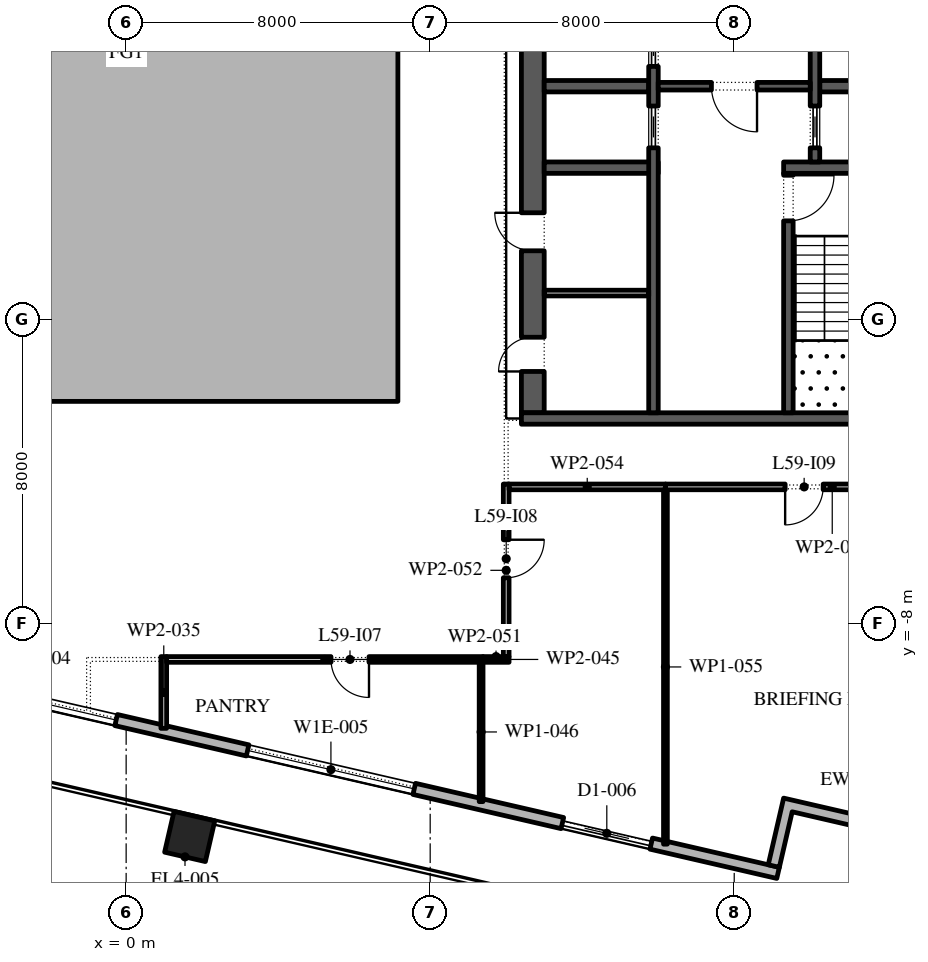
"""IFC4 building model, lengths in metres.
Left out: names, types, materials, properties, quantities, classifications, styles, units other than length and angle.
Written with IfcOpenShell. Run it as: python <this file> out.ifc"""

import sys

from ifc_helpers import new_model, si_unit, direction, frame, frame_2d, origin, origin_2d, place, context, subcontext, project, spatial, polyline, rectangle, outline, extrude, element, fill, save


model = new_model("IFC4")
c1 = context("Model", 3, precision=1e-05, world=origin(), true_north=direction((0.0, 1.0)))
c2 = subcontext(c1, "Body", "Model", "MODEL_VIEW")
j1 = project(units=[si_unit("LENGTHUNIT", "METRE"), si_unit("PLANEANGLEUNIT", "RADIAN")], contexts=[c1])
p1 = place(None, origin())
s1 = spatial("IfcSite", under=j1, at=p1, CompositionType="ELEMENT")
p2 = place(p1, origin())
s2 = spatial("IfcBuilding", under=s1, at=p2, CompositionType="ELEMENT")
p3 = place(p2, frame((0.0, 0.0, 272.4)))
s3 = spatial("IfcBuildingStorey", under=s2, at=p3, CompositionType="ELEMENT", Elevation=272.4)
p4 = place(p3, frame((1.672, -13.599, 0.0), z_axis=(0.0, 0.0, 1.0), x_axis=(0.974370064785, -0.224951054344, 0.0)))
e1 = element("IfcColumn", 1, at=p4, inside=s3, PredefinedType="COLUMN", context=c2, shape_type="SweptSolid", body=[
    extrude(rectangle(XDim=1.1, YDim=1.1, at=origin_2d()), origin(), (0.0, 0.0, 1.0), 4.2),
])
p5 = place(p3, origin())
e2 = element("IfcWall", 2, at=p5, inside=s3, PredefinedType="STANDARD", context=c2, shape_type="SweptSolid", body=[
    extrude(outline(polyline([(-7.15, -2.15), (7.15, -2.15), (7.15, 16.15), (-7.15, 16.15), (-7.15, -2.15)]), holes=[polyline([(-7.0, -2.0), (-7.0, 16.0), (7.0, 16.0), (7.0, -2.0), (-7.0, -2.0)])]), origin(), (0.0, 0.0, 1.0), 4.0),
])
p6 = place(p3, frame((-29.616, -3.758, 0.0), z_axis=(0.0, 0.0, 1.0), x_axis=(0.974370532314, -0.224949029246, 0.0)))
e3 = element("IfcWall", 3, at=p6, inside=s3, PredefinedType="STANDARD", context=c2, shape_type="SweptSolid", body=[
    extrude(rectangle(XDim=48.0, YDim=0.3, at=frame_2d((24.0, 0.0))), origin(), (0.0, 0.0, 1.0), 4.0),
])
p7 = place(p6, frame((1.625, 0.0, 0.45)))
e4 = element("IfcOpeningElement", 4, at=p7, cuts=e3, PredefinedType="OPENING", context=c2, shape_type="SweptSolid", body=[
    extrude(rectangle(XDim=4.5, YDim=3.05, at=frame_2d((2.25, 1.525))), frame((0.0, 0.16, 0.0), z_axis=(0.0, -1.0, 0.0), x_axis=(1.0, 0.0, 0.0)), (0.0, 0.0, 1.0), 0.32),
])
p8 = place(p6, frame((10.575, 0.0, 0.0)))
e5 = element("IfcOpeningElement", 5, at=p8, cuts=e3, PredefinedType="OPENING", context=c2, shape_type="SweptSolid", body=[
    extrude(rectangle(XDim=2.4, YDim=3.5, at=frame_2d((1.2, 1.75))), frame((0.0, 0.16, 0.0), z_axis=(0.0, -1.0, 0.0), x_axis=(1.0, 0.0, 0.0)), (0.0, 0.0, 1.0), 0.32),
])
p9 = place(p6, frame((17.575, 0.0, 0.45)))
e6 = element("IfcOpeningElement", 6, at=p9, cuts=e3, PredefinedType="OPENING", context=c2, shape_type="SweptSolid", body=[
    extrude(rectangle(XDim=4.5, YDim=3.0, at=frame_2d((2.25, 1.5))), frame((0.0, 0.16, 0.0), z_axis=(0.0, -1.0, 0.0), x_axis=(1.0, 0.0, 0.0)), (0.0, 0.0, 1.0), 0.32),
])
p10 = place(p6, frame((25.625, 0.0, 0.45)))
e7 = element("IfcOpeningElement", 7, at=p10, cuts=e3, PredefinedType="OPENING", context=c2, shape_type="SweptSolid", body=[
    extrude(rectangle(XDim=4.5, YDim=2.95, at=frame_2d((2.25, 1.475))), frame((0.0, 0.16, 0.0), z_axis=(0.0, -1.0, 0.0), x_axis=(1.0, 0.0, 0.0)), (0.0, 0.0, 1.0), 0.32),
])
p11 = place(p6, frame((33.675, 0.0, 0.45)))
e8 = element("IfcOpeningElement", 8, at=p11, cuts=e3, PredefinedType="OPENING", context=c2, shape_type="SweptSolid", body=[
    extrude(rectangle(XDim=4.5, YDim=2.825, at=frame_2d((2.25, 1.413))), frame((0.0, 0.16, 0.0), z_axis=(0.0, -1.0, 0.0), x_axis=(1.0, 0.0, 0.0)), (0.0, 0.0, 1.0), 0.32),
])
p12 = place(p6, frame((42.175, 0.0, 0.0)))
e9 = element("IfcOpeningElement", 9, at=p12, cuts=e3, PredefinedType="OPENING", context=c2, shape_type="SweptSolid", body=[
    extrude(rectangle(XDim=2.4, YDim=3.5, at=frame_2d((1.2, 1.75))), frame((0.0, 0.16, 0.0), z_axis=(0.0, -1.0, 0.0), x_axis=(1.0, 0.0, 0.0)), (0.0, 0.0, 1.0), 0.32),
])
p13 = place(p3, origin())
e10 = element("IfcWall", 10, at=p13, inside=s3, PredefinedType="STANDARD", context=c2, shape_type="SweptSolid", body=[
    extrude(outline(polyline([(19.054, -12.993), (19.459, -11.24), (21.505, -11.712), (21.438, -12.004), (19.684, -11.599), (19.279, -13.353), (17.525, -12.948), (17.188, -14.41), (16.895, -14.342), (17.3, -12.588), (19.054, -12.993)])), origin(), (0.0, 0.0, 1.0), 4.0),
])
p14 = place(p3, frame((10.7, -2.45, 0.0), z_axis=(0.0, 0.0, 1.0), x_axis=(0.0, 1.0, 0.0)))
e11 = element("IfcWall", 11, at=p14, inside=s3, PredefinedType="SHEAR", context=c2, shape_type="SweptSolid", body=[
    extrude(rectangle(XDim=27.9, YDim=0.6, at=frame_2d((13.95, 0.0))), origin(), (0.0, 0.0, 1.0), 4.0),
])
p15 = place(p14, frame((23.65, 0.0, 0.0)))
e12 = element("IfcOpeningElement", 12, at=p15, cuts=e11, PredefinedType="OPENING", context=c2, shape_type="SweptSolid", body=[
    extrude(rectangle(XDim=2.4, YDim=2.1, at=frame_2d((1.2, 1.05))), frame((0.0, 0.31, 0.0), z_axis=(0.0, -1.0, 0.0), x_axis=(1.0, 0.0, 0.0)), (0.0, 0.0, 1.0), 0.62),
])
p16 = place(p14, frame((1.087, 0.0, 0.0)))
e13 = element("IfcOpeningElement", 13, at=p16, cuts=e11, PredefinedType="OPENING", context=c2, shape_type="SweptSolid", body=[
    extrude(rectangle(XDim=0.9, YDim=2.1, at=frame_2d((0.45, 1.05))), frame((0.0, 0.31, 0.0), z_axis=(0.0, -1.0, 0.0), x_axis=(1.0, 0.0, 0.0)), (0.0, 0.0, 1.0), 0.62),
])
p17 = place(p14, frame((4.262, 0.0, 0.0)))
e14 = element("IfcOpeningElement", 14, at=p17, cuts=e11, PredefinedType="OPENING", context=c2, shape_type="SweptSolid", body=[
    extrude(rectangle(XDim=1.0, YDim=2.1, at=frame_2d((0.5, 1.05))), frame((0.0, 0.31, 0.0), z_axis=(0.0, -1.0, 0.0), x_axis=(1.0, 0.0, 0.0)), (0.0, 0.0, 1.0), 0.62),
])
p18 = place(p3, frame((10.4, -2.6, 0.0), z_axis=(0.0, 0.0, 1.0), x_axis=(1.0, 0.0, 0.0)))
e15 = element("IfcWall", 15, at=p18, inside=s3, PredefinedType="SHEAR", context=c2, shape_type="SweptSolid", body=[
    extrude(rectangle(XDim=11.2, YDim=0.3, at=frame_2d((5.6, 0.0))), origin(), (0.0, 0.0, 1.0), 4.0),
])
p19 = place(p3, frame((17.3, 4.0, 0.0), z_axis=(0.0, 0.0, 1.0), x_axis=(1.0, 0.0, 0.0)))
e16 = element("IfcWall", 16, at=p19, inside=s3, PredefinedType="SHEAR", context=c2, shape_type="SweptSolid", body=[
    extrude(rectangle(XDim=3.7, YDim=0.3, at=frame_2d((1.85, 0.0))), origin(), (0.0, 0.0, 1.0), 4.0),
])
p20 = place(p3, frame((17.425, -2.45, 0.0), z_axis=(0.0, 0.0, 1.0), x_axis=(0.0, 1.0, 0.0)))
e17 = element("IfcWall", 17, at=p20, inside=s3, PredefinedType="SHEAR", context=c2, shape_type="SweptSolid", body=[
    extrude(rectangle(XDim=6.3, YDim=0.25, at=frame_2d((3.15, 0.0))), origin(), (0.0, 0.0, 1.0), 4.0),
])
p21 = place(p20, frame((5.05, 0.0, 0.0)))
e18 = element("IfcOpeningElement", 18, at=p21, cuts=e17, PredefinedType="OPENING", context=c2, shape_type="SweptSolid", body=[
    extrude(rectangle(XDim=1.2, YDim=2.1, at=frame_2d((0.6, 1.05))), frame((0.0, 0.135, 0.0), z_axis=(0.0, -1.0, 0.0), x_axis=(1.0, 0.0, 0.0)), (0.0, 0.0, 1.0), 0.27),
])
p22 = place(p3, frame((18.25, 6.143, 0.0), z_axis=(0.0, 0.0, 1.0), x_axis=(1.0, 0.0, 0.0)))
e19 = element("IfcWall", 19, at=p22, inside=s3, PredefinedType="SHEAR", context=c2, shape_type="SweptSolid", body=[
    extrude(rectangle(XDim=2.75, YDim=0.3, at=frame_2d((1.375, 0.0))), origin(), (0.0, 0.0, 1.0), 4.0),
])
p23 = place(p3, frame((18.125, 4.15, 0.0), z_axis=(0.0, 0.0, 1.0), x_axis=(0.0, 1.0, 0.0)))
e20 = element("IfcWall", 20, at=p23, inside=s3, PredefinedType="SHEAR", context=c2, shape_type="SweptSolid", body=[
    extrude(rectangle(XDim=14.7, YDim=0.25, at=frame_2d((7.35, 0.0))), origin(), (0.0, 0.0, 1.0), 4.0),
])
p24 = place(p23, frame((6.9, 0.0, 0.0)))
e21 = element("IfcOpeningElement", 21, at=p24, cuts=e20, PredefinedType="OPENING", context=c2, shape_type="SweptSolid", body=[
    extrude(rectangle(XDim=0.9, YDim=2.1, at=frame_2d((0.45, 1.05))), frame((0.0, 0.135, 0.0), z_axis=(0.0, -1.0, 0.0), x_axis=(1.0, 0.0, 0.0)), (0.0, 0.0, 1.0), 0.27),
])
p25 = place(p23, frame((0.371, 0.0, 0.0)))
e22 = element("IfcOpeningElement", 22, at=p25, cuts=e20, PredefinedType="OPENING", context=c2, shape_type="SweptSolid", body=[
    extrude(rectangle(XDim=1.1, YDim=2.1, at=frame_2d((0.55, 1.05))), frame((0.0, 0.135, 0.0), z_axis=(0.0, -1.0, 0.0), x_axis=(1.0, 0.0, 0.0)), (0.0, 0.0, 1.0), 0.27),
])
p26 = place(p23, frame((13.229, 0.0, 0.0)))
e23 = element("IfcOpeningElement", 23, at=p26, cuts=e20, PredefinedType="OPENING", context=c2, shape_type="SweptSolid", body=[
    extrude(rectangle(XDim=1.1, YDim=2.1, at=frame_2d((0.55, 1.05))), frame((0.0, 0.135, 0.0), z_axis=(0.0, -1.0, 0.0), x_axis=(1.0, 0.0, 0.0)), (0.0, 0.0, 1.0), 0.27),
])
p27 = place(p3, frame((11.0, 4.0, 0.0), z_axis=(0.0, 0.0, 1.0), x_axis=(1.0, 0.0, 0.0)))
e24 = element("IfcWall", 24, at=p27, inside=s3, PredefinedType="SHEAR", context=c2, shape_type="SweptSolid", body=[
    extrude(rectangle(XDim=3.0, YDim=0.3, at=frame_2d((1.5, 0.0))), origin(), (0.0, 0.0, 1.0), 4.0),
])
p28 = place(p3, frame((11.0, 6.143, 0.0), z_axis=(0.0, 0.0, 1.0), x_axis=(1.0, 0.0, 0.0)))
e25 = element("IfcWall", 25, at=p28, inside=s3, PredefinedType="SHEAR", context=c2, shape_type="SweptSolid", body=[
    extrude(rectangle(XDim=2.75, YDim=0.3, at=frame_2d((1.375, 0.0))), origin(), (0.0, 0.0, 1.0), 4.0),
])
p29 = place(p3, frame((13.875, -2.45, 0.0), z_axis=(0.0, 0.0, 1.0), x_axis=(0.0, 1.0, 0.0)))
e26 = element("IfcWall", 26, at=p29, inside=s3, PredefinedType="SHEAR", context=c2, shape_type="SweptSolid", body=[
    extrude(rectangle(XDim=21.3, YDim=0.25, at=frame_2d((10.65, 0.0))), origin(), (0.0, 0.0, 1.0), 4.0),
])
p30 = place(p29, frame((17.786, 0.0, 0.0)))
e27 = element("IfcOpeningElement", 27, at=p30, cuts=e26, PredefinedType="OPENING", context=c2, shape_type="SweptSolid", body=[
    extrude(rectangle(XDim=0.9, YDim=2.1, at=frame_2d((0.45, 1.05))), frame((0.0, 0.135, 0.0), z_axis=(0.0, -1.0, 0.0), x_axis=(1.0, 0.0, 0.0)), (0.0, 0.0, 1.0), 0.27),
])
p31 = place(p29, frame((6.971, 0.0, 0.0)))
e28 = element("IfcOpeningElement", 28, at=p31, cuts=e26, PredefinedType="OPENING", context=c2, shape_type="SweptSolid", body=[
    extrude(rectangle(XDim=1.1, YDim=2.1, at=frame_2d((0.55, 1.05))), frame((0.0, 0.135, 0.0), z_axis=(0.0, -1.0, 0.0), x_axis=(1.0, 0.0, 0.0)), (0.0, 0.0, 1.0), 0.27),
])
p32 = place(p29, frame((9.114, 0.0, 0.0)))
e29 = element("IfcOpeningElement", 29, at=p32, cuts=e26, PredefinedType="OPENING", context=c2, shape_type="SweptSolid", body=[
    extrude(rectangle(XDim=1.1, YDim=2.1, at=frame_2d((0.55, 1.05))), frame((0.0, 0.135, 0.0), z_axis=(0.0, -1.0, 0.0), x_axis=(1.0, 0.0, 0.0)), (0.0, 0.0, 1.0), 0.27),
])
p33 = place(p29, frame((11.257, 0.0, 0.0)))
e30 = element("IfcOpeningElement", 30, at=p33, cuts=e26, PredefinedType="OPENING", context=c2, shape_type="SweptSolid", body=[
    extrude(rectangle(XDim=1.1, YDim=2.1, at=frame_2d((0.55, 1.05))), frame((0.0, 0.135, 0.0), z_axis=(0.0, -1.0, 0.0), x_axis=(1.0, 0.0, 0.0)), (0.0, 0.0, 1.0), 0.27),
])
p34 = place(p29, frame((13.4, 0.0, 0.0)))
e31 = element("IfcOpeningElement", 31, at=p34, cuts=e26, PredefinedType="OPENING", context=c2, shape_type="SweptSolid", body=[
    extrude(rectangle(XDim=1.1, YDim=2.1, at=frame_2d((0.55, 1.05))), frame((0.0, 0.135, 0.0), z_axis=(0.0, -1.0, 0.0), x_axis=(1.0, 0.0, 0.0)), (0.0, 0.0, 1.0), 0.27),
])
p35 = place(p3, frame((14.0, 6.143, 0.0), z_axis=(0.0, 0.0, 1.0), x_axis=(1.0, 0.0, 0.0)))
e32 = element("IfcWall", 32, at=p35, inside=s3, PredefinedType="SHEAR", context=c2, shape_type="SweptSolid", body=[
    extrude(rectangle(XDim=4.0, YDim=0.2, at=frame_2d((2.0, 0.0))), origin(), (0.0, 0.0, 1.0), 4.0),
])
p36 = place(p35, frame((1.4, 0.0, 0.0)))
e33 = element("IfcOpeningElement", 33, at=p36, cuts=e32, PredefinedType="OPENING", context=c2, shape_type="SweptSolid", body=[
    extrude(rectangle(XDim=1.2, YDim=2.1, at=frame_2d((0.6, 1.05))), frame((0.0, 0.11, 0.0), z_axis=(0.0, -1.0, 0.0), x_axis=(1.0, 0.0, 0.0)), (0.0, 0.0, 1.0), 0.22),
])
p37 = place(p3, frame((11.0, 0.7, 0.0), z_axis=(0.0, 0.0, 1.0), x_axis=(1.0, 0.0, 0.0)))
e34 = element("IfcWall", 34, at=p37, inside=s3, PredefinedType="PARTITIONING", context=c2, shape_type="SweptSolid", body=[
    extrude(rectangle(XDim=2.75, YDim=0.15, at=frame_2d((1.375, 0.0))), origin(), (0.0, 0.0, 1.0), 4.0),
])
p38 = place(p3, frame((0.99, -8.865, 0.0), z_axis=(0.0, 0.0, 1.0), x_axis=(0.0, -1.0, 0.0)))
e35 = element("IfcWall", 35, at=p38, inside=s3, PredefinedType="PARTITIONING", context=c2, shape_type="SweptSolid", body=[
    extrude(rectangle(XDim=1.888, YDim=0.15, at=frame_2d((0.944, 0.0))), origin(), (0.0, 0.0, 1.0), 4.0),
])
p39 = place(p3, frame((9.39, -8.94, 0.0), z_axis=(0.0, 0.0, 1.0), x_axis=(-1.0, 0.0, 0.0)))
e36 = element("IfcWall", 36, at=p39, inside=s3, PredefinedType="PARTITIONING", context=c2, shape_type="SweptSolid", body=[
    extrude(rectangle(XDim=8.325, YDim=0.15, at=frame_2d((4.163, 0.0))), origin(), (0.0, 0.0, 1.0), 4.0),
])
p40 = place(p39, frame((3.0, 0.0, 0.0)))
e37 = element("IfcOpeningElement", 37, at=p40, cuts=e36, PredefinedType="OPENING", context=c2, shape_type="SweptSolid", body=[
    extrude(rectangle(XDim=1.0, YDim=2.1, at=frame_2d((0.5, 1.05))), frame((0.0, 0.085, 0.0), z_axis=(0.0, -1.0, 0.0), x_axis=(1.0, 0.0, 0.0)), (0.0, 0.0, 1.0), 0.17),
])
p41 = place(p3, frame((9.34, -9.015, 0.0), z_axis=(0.0, 0.0, 1.0), x_axis=(0.0, -1.0, 0.0)))
e38 = element("IfcWall", 38, at=p41, inside=s3, PredefinedType="PARTITIONING", context=c2, shape_type="SweptSolid", body=[
    extrude(rectangle(XDim=3.666, YDim=0.1, at=frame_2d((1.833, 0.0))), origin(), (0.0, 0.0, 1.0), 4.0),
])
p42 = place(p3, frame((10.075, -8.94, 0.0), z_axis=(0.0, 0.0, 1.0), x_axis=(-1.0, 0.0, 0.0)))
e39 = element("IfcWall", 39, at=p42, inside=s3, PredefinedType="PARTITIONING", context=c2, shape_type="SweptSolid", body=[
    extrude(rectangle(XDim=0.685, YDim=0.15, at=frame_2d((0.343, 0.0))), origin(), (0.0, 0.0, 1.0), 4.0),
])
p43 = place(p3, frame((10.0, -4.325, 0.0), z_axis=(0.0, 0.0, 1.0), x_axis=(0.0, -1.0, 0.0)))
e40 = element("IfcWall", 40, at=p43, inside=s3, PredefinedType="PARTITIONING", context=c2, shape_type="SweptSolid", body=[
    extrude(rectangle(XDim=4.54, YDim=0.15, at=frame_2d((2.27, 0.0))), origin(), (0.0, 0.0, 1.0), 4.0),
])
p44 = place(p43, frame((1.465, 0.0, 0.0)))
e41 = element("IfcOpeningElement", 41, at=p44, cuts=e40, PredefinedType="OPENING", context=c2, shape_type="SweptSolid", body=[
    extrude(rectangle(XDim=1.0, YDim=2.1, at=frame_2d((0.5, 1.05))), frame((0.0, 0.085, 0.0), z_axis=(0.0, -1.0, 0.0), x_axis=(1.0, 0.0, 0.0)), (0.0, 0.0, 1.0), 0.17),
])
p45 = place(p3, frame((14.19, -4.4, 0.0), z_axis=(0.0, 0.0, 1.0), x_axis=(-1.0, 0.0, 0.0)))
e42 = element("IfcWall", 42, at=p45, inside=s3, PredefinedType="PARTITIONING", context=c2, shape_type="SweptSolid", body=[
    extrude(rectangle(XDim=4.115, YDim=0.15, at=frame_2d((2.058, 0.0))), origin(), (0.0, 0.0, 1.0), 4.0),
])
p46 = place(p3, frame((14.19, -4.475, 0.0), z_axis=(0.0, 0.0, 1.0), x_axis=(0.0, -1.0, 0.0)))
e43 = element("IfcWall", 43, at=p46, inside=s3, PredefinedType="PARTITIONING", context=c2, shape_type="SweptSolid", body=[
    extrude(rectangle(XDim=9.325, YDim=0.1, at=frame_2d((4.663, 0.0))), origin(), (0.0, 0.0, 1.0), 4.0),
])
p47 = place(p3, frame((22.968, -4.4, 0.0), z_axis=(0.0, 0.0, 1.0), x_axis=(-1.0, 0.0, 0.0)))
e44 = element("IfcWall", 44, at=p47, inside=s3, PredefinedType="PARTITIONING", context=c2, shape_type="SweptSolid", body=[
    extrude(rectangle(XDim=8.778, YDim=0.15, at=frame_2d((4.389, 0.0))), origin(), (0.0, 0.0, 1.0), 4.0),
])
p48 = place(p47, frame((4.628, 0.0, 0.0)))
e45 = element("IfcOpeningElement", 45, at=p48, cuts=e44, PredefinedType="OPENING", context=c2, shape_type="SweptSolid", body=[
    extrude(rectangle(XDim=1.0, YDim=2.1, at=frame_2d((0.5, 1.05))), frame((0.0, 0.085, 0.0), z_axis=(0.0, -1.0, 0.0), x_axis=(1.0, 0.0, 0.0)), (0.0, 0.0, 1.0), 0.17),
])
p49 = place(p10, origin())
e46 = element("IfcWindow", 46, at=p49, inside=s3, PartitioningType="DOUBLE_PANEL_VERTICAL", PredefinedType="WINDOW", context=c2, shape_type="SweptSolid", body=[
    extrude(rectangle(XDim=4.5, YDim=2.95, at=frame_2d((2.25, 1.475))), frame((0.0, 0.03, 0.0), z_axis=(0.0, -1.0, 0.0), x_axis=(1.0, 0.0, 0.0)), (0.0, 0.0, 1.0), 0.06),
])
fill(e7, e46)
p50 = place(p11, origin())
e47 = element("IfcWindow", 47, at=p50, inside=s3, PartitioningType="DOUBLE_PANEL_VERTICAL", PredefinedType="WINDOW", context=c2, shape_type="SweptSolid", body=[
    extrude(rectangle(XDim=4.5, YDim=2.825, at=frame_2d((2.25, 1.413))), frame((0.0, 0.03, 0.0), z_axis=(0.0, -1.0, 0.0), x_axis=(1.0, 0.0, 0.0)), (0.0, 0.0, 1.0), 0.06),
])
fill(e8, e47)
p51 = place(p12, origin())
e48 = element("IfcDoor", 48, at=p51, inside=s3, OperationType="DOUBLE_DOOR_SLIDING", PredefinedType="DOOR", context=c2, shape_type="SweptSolid", body=[
    extrude(rectangle(XDim=2.4, YDim=3.5, at=frame_2d((1.2, 1.75))), frame((0.0, 0.025, 0.0), z_axis=(0.0, -1.0, 0.0), x_axis=(1.0, 0.0, 0.0)), (0.0, 0.0, 1.0), 0.05),
])
fill(e9, e48)
p52 = place(p25, origin())
e49 = element("IfcDoor", 49, at=p52, inside=s3, OperationType="SLIDING_TO_LEFT", PredefinedType="DOOR", context=c2, shape_type="SweptSolid", body=[
    extrude(rectangle(XDim=1.1, YDim=2.1, at=frame_2d((0.55, 1.05))), frame((0.0, 0.025, 0.0), z_axis=(0.0, -1.0, 0.0), x_axis=(1.0, 0.0, 0.0)), (0.0, 0.0, 1.0), 0.05),
])
fill(e22, e49)
p53 = place(p31, origin())
e50 = element("IfcDoor", 50, at=p53, inside=s3, OperationType="SLIDING_TO_LEFT", PredefinedType="DOOR", context=c2, shape_type="SweptSolid", body=[
    extrude(rectangle(XDim=1.1, YDim=2.1, at=frame_2d((0.55, 1.05))), frame((0.0, 0.025, 0.0), z_axis=(0.0, -1.0, 0.0), x_axis=(1.0, 0.0, 0.0)), (0.0, 0.0, 1.0), 0.05),
])
fill(e28, e50)
p54 = place(p32, origin())
e51 = element("IfcDoor", 51, at=p54, inside=s3, OperationType="SLIDING_TO_LEFT", PredefinedType="DOOR", context=c2, shape_type="SweptSolid", body=[
    extrude(rectangle(XDim=1.1, YDim=2.1, at=frame_2d((0.55, 1.05))), frame((0.0, 0.025, 0.0), z_axis=(0.0, -1.0, 0.0), x_axis=(1.0, 0.0, 0.0)), (0.0, 0.0, 1.0), 0.05),
])
fill(e29, e51)
p55 = place(p36, frame((1.2, 0.0, 0.0), z_axis=(0.0, 0.0, 1.0), x_axis=(-1.0, 0.0, 0.0)))
e52 = element("IfcDoor", 52, at=p55, inside=s3, OperationType="SINGLE_SWING_RIGHT", PredefinedType="DOOR", context=c2, shape_type="SweptSolid", body=[
    extrude(rectangle(XDim=1.2, YDim=2.1, at=frame_2d((0.6, 1.05))), frame((0.0, 0.025, 0.0), z_axis=(0.0, -1.0, 0.0), x_axis=(1.0, 0.0, 0.0)), (0.0, 0.0, 1.0), 0.05),
])
fill(e33, e52)
p56 = place(p21, frame((1.2, 0.0, 0.0), z_axis=(0.0, 0.0, 1.0), x_axis=(-1.0, 0.0, 0.0)))
e53 = element("IfcDoor", 53, at=p56, inside=s3, OperationType="SINGLE_SWING_RIGHT", PredefinedType="DOOR", context=c2, shape_type="SweptSolid", body=[
    extrude(rectangle(XDim=1.2, YDim=2.1, at=frame_2d((0.6, 1.05))), frame((0.0, 0.025, 0.0), z_axis=(0.0, -1.0, 0.0), x_axis=(1.0, 0.0, 0.0)), (0.0, 0.0, 1.0), 0.05),
])
fill(e18, e53)
p57 = place(p16, origin())
e54 = element("IfcDoor", 54, at=p57, inside=s3, OperationType="SINGLE_SWING_RIGHT", PredefinedType="DOOR", context=c2, shape_type="SweptSolid", body=[
    extrude(rectangle(XDim=0.9, YDim=2.1, at=frame_2d((0.45, 1.05))), frame((0.0, -0.25, 0.0), z_axis=(0.0, -1.0, 0.0), x_axis=(1.0, 0.0, 0.0)), (0.0, 0.0, 1.0), 0.05),
])
fill(e13, e54)
p58 = place(p17, origin())
e55 = element("IfcDoor", 55, at=p58, inside=s3, OperationType="SINGLE_SWING_LEFT", PredefinedType="DOOR", context=c2, shape_type="SweptSolid", body=[
    extrude(rectangle(XDim=1.0, YDim=2.1, at=frame_2d((0.5, 1.05))), frame((0.0, -0.25, 0.0), z_axis=(0.0, -1.0, 0.0), x_axis=(1.0, 0.0, 0.0)), (0.0, 0.0, 1.0), 0.05),
])
fill(e14, e55)
p59 = place(p40, origin())
e56 = element("IfcDoor", 56, at=p59, inside=s3, OperationType="SINGLE_SWING_RIGHT", PredefinedType="DOOR", context=c2, shape_type="SweptSolid", body=[
    extrude(rectangle(XDim=1.0, YDim=2.1, at=frame_2d((0.5, 1.05))), frame((0.0, 0.025, 0.0), z_axis=(0.0, -1.0, 0.0), x_axis=(1.0, 0.0, 0.0)), (0.0, 0.0, 1.0), 0.05),
])
fill(e37, e56)
p60 = place(p44, origin())
e57 = element("IfcDoor", 57, at=p60, inside=s3, OperationType="SINGLE_SWING_RIGHT", PredefinedType="DOOR", context=c2, shape_type="SweptSolid", body=[
    extrude(rectangle(XDim=1.0, YDim=2.1, at=frame_2d((0.5, 1.05))), frame((0.0, 0.025, 0.0), z_axis=(0.0, -1.0, 0.0), x_axis=(1.0, 0.0, 0.0)), (0.0, 0.0, 1.0), 0.05),
])
fill(e41, e57)
p61 = place(p48, origin())
e58 = element("IfcDoor", 58, at=p61, inside=s3, OperationType="SINGLE_SWING_LEFT", PredefinedType="DOOR", context=c2, shape_type="SweptSolid", body=[
    extrude(rectangle(XDim=1.0, YDim=2.1, at=frame_2d((0.5, 1.05))), frame((0.0, 0.025, 0.0), z_axis=(0.0, -1.0, 0.0), x_axis=(1.0, 0.0, 0.0)), (0.0, 0.0, 1.0), 0.05),
])
fill(e45, e58)
save(model, sys.argv[1])
